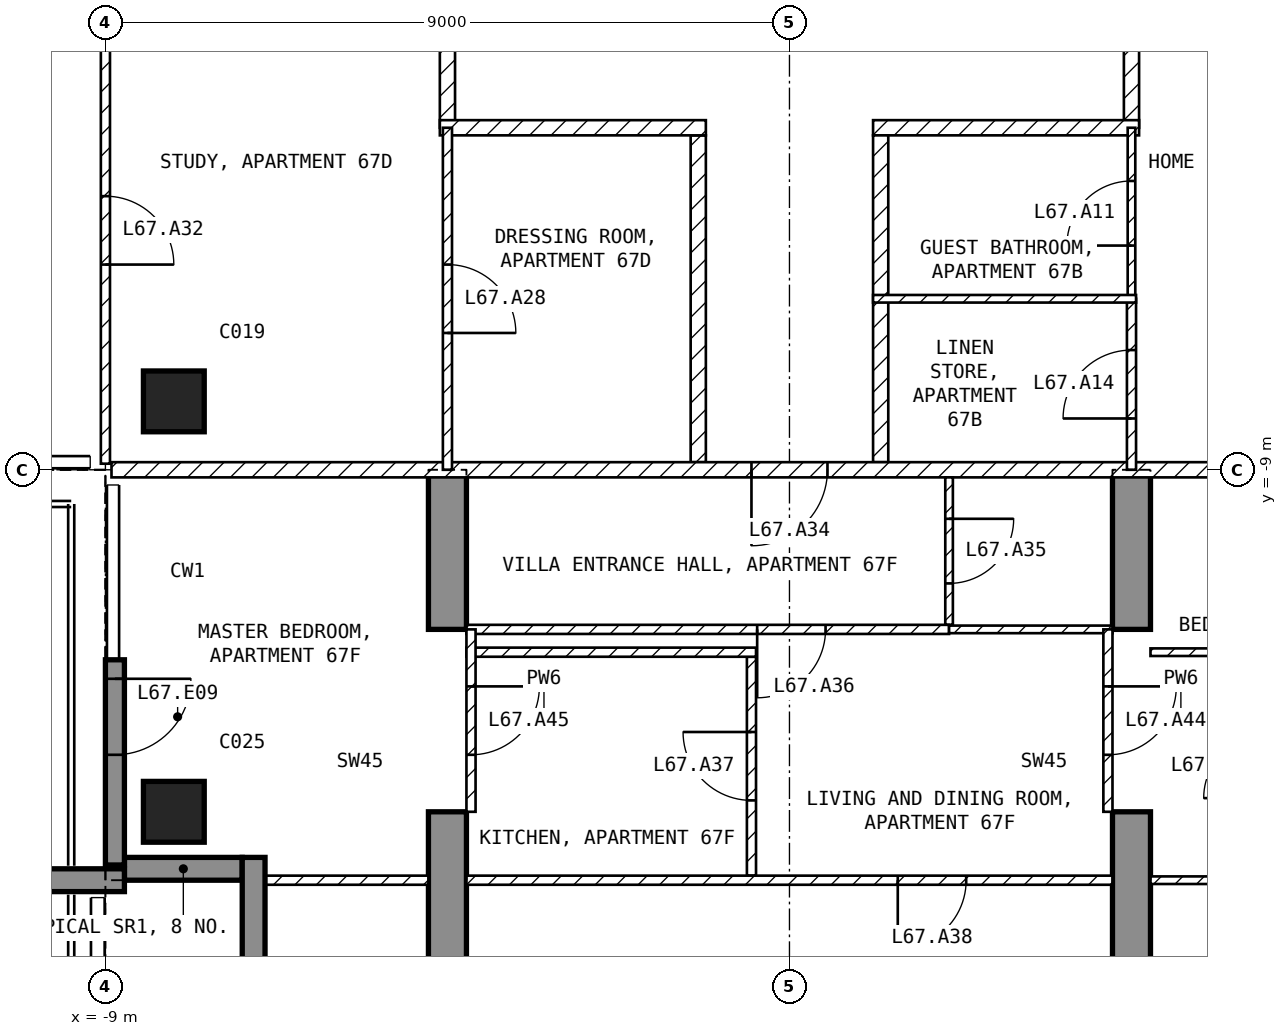
"""IFC4 building model, lengths in metres.
Left out: names, types, materials, properties, quantities, classifications, styles, units other than length and angle.
Written with IfcOpenShell. Run it as: python <this file> out.ifc"""

import sys

from ifc_helpers import new_model, si_unit, direction, frame, frame_2d, origin, origin_2d, place, context, subcontext, project, spatial, polyline, rectangle, outline, extrude, element, fill, save


model = new_model("IFC4")
c1 = context("Model", 3, precision=1e-05, world=origin(), true_north=direction((0.0, 1.0)))
c2 = subcontext(c1, "Body", "Model", "MODEL_VIEW")
j1 = project(units=[si_unit("LENGTHUNIT", "METRE"), si_unit("PLANEANGLEUNIT", "RADIAN")], contexts=[c1])
p1 = place(None, origin())
s1 = spatial("IfcSite", under=j1, at=p1, CompositionType="ELEMENT")
p2 = place(p1, origin())
s2 = spatial("IfcBuilding", under=s1, at=p2, CompositionType="ELEMENT")
p3 = place(p2, frame((0.0, 0.0, 264.0)))
s3 = spatial("IfcBuildingStorey", under=s2, at=p3, CompositionType="ELEMENT", Elevation=264.0)
for number, where, z_axis, x_axis in (
    (1, (-8.1, -13.5, -0.25), (0.0, 0.0, 1.0), (1.0, 0.0, 0.0)),
    (2, (-8.1, -8.1, -0.25), (0.0, 0.0, 1.0), (1.0, 0.0, 0.0)),
):
    element("IfcColumn", number, at=place(p3, frame(where, z_axis=z_axis, x_axis=x_axis)), inside=s3, PredefinedType="COLUMN", context=c2, shape_type="SweptSolid", body=[
        extrude(rectangle(XDim=0.8, YDim=0.8, at=origin_2d()), origin(), (0.0, 0.0, 1.0), 3.5),
    ])
for number, where, z_axis, x_axis in (
    (3, (-4.75, -16.7, -0.25), (1.0, 0.0, 0.0), (0.0, 1.0, 0.0)),
    (4, (4.25, -16.7, -0.25), (1.0, 0.0, 0.0), (0.0, 1.0, 0.0)),
):
    element("IfcWall", number, at=place(p3, frame(where, z_axis=z_axis, x_axis=x_axis)), inside=s3, PredefinedType="SHEAR", context=c2, shape_type="SweptSolid", body=[
        extrude(outline(polyline([(0.0, 0.0), (3.2, 0.0), (3.2, 2.65), (5.6, 2.65), (5.6, 0.0), (7.7, 0.0), (7.7, 3.5), (0.0, 3.5), (0.0, 0.0)])), origin(), (0.0, 0.0, 1.0), 0.5),
    ])
p4 = place(p3, frame((-8.875, -11.5, 0.0), z_axis=(0.0, 0.0, 1.0), x_axis=(0.0, -1.0, 0.0)))
e5 = element("IfcWall", 5, at=p4, inside=s3, PredefinedType="SOLIDWALL", context=c2, shape_type="SweptSolid", body=[
    extrude(rectangle(XDim=2.7, YDim=0.25, at=frame_2d((1.35, 0.0))), origin(), (0.0, 0.0, 1.0), 3.25),
])
p5 = place(p4, frame((0.25, 0.0, 0.0)))
e6 = element("IfcOpeningElement", 6, at=p5, cuts=e5, PredefinedType="OPENING", context=c2, shape_type="SweptSolid", body=[
    extrude(rectangle(XDim=1.0, YDim=2.4, at=frame_2d((0.5, 1.2))), frame((0.0, 0.135, 0.0), z_axis=(0.0, -1.0, 0.0), x_axis=(1.0, 0.0, 0.0)), (0.0, 0.0, 1.0), 0.27),
])
p6 = place(p3, frame((-8.75, -14.25, 0.0), z_axis=(0.0, 0.0, 1.0), x_axis=(1.0, 0.0, 0.0)))
e7 = element("IfcWall", 7, at=p6, inside=s3, PredefinedType="SOLIDWALL", context=c2, shape_type="SweptSolid", body=[
    extrude(rectangle(XDim=1.55, YDim=0.3, at=frame_2d((0.775, 0.0))), origin(), (0.0, 0.0, 1.0), 3.25),
])
p7 = place(p3, frame((-7.05, -14.1, 0.0), z_axis=(0.0, 0.0, 1.0), x_axis=(0.0, -1.0, 0.0)))
e8 = element("IfcWall", 8, at=p7, inside=s3, PredefinedType="SOLIDWALL", context=c2, shape_type="SweptSolid", body=[
    extrude(rectangle(XDim=1.8, YDim=0.3, at=frame_2d((0.9, 0.0))), origin(), (0.0, 0.0, 1.0), 3.25),
])
p8 = place(p3, frame((-8.75, -14.4, 0.0), z_axis=(0.0, 0.0, 1.0), x_axis=(-1.0, 0.0, 0.0)))
e9 = element("IfcWall", 9, at=p8, inside=s3, PredefinedType="SOLIDWALL", context=c2, shape_type="SweptSolid", body=[
    extrude(rectangle(XDim=2.95, YDim=0.3, at=frame_2d((1.475, 0.0))), origin(), (0.0, 0.0, 1.0), 3.25),
])
p9 = place(p3, frame((4.5, -1.3, 0.0), z_axis=(0.0, 0.0, 1.0), x_axis=(0.0, -1.0, 0.0)))
e10 = element("IfcWall", 10, at=p9, inside=s3, PredefinedType="PARTITIONING", context=c2, shape_type="SweptSolid", body=[
    extrude(rectangle(XDim=3.2, YDim=0.2, at=frame_2d((1.6, 0.0))), origin(), (0.0, 0.0, 1.0), 3.25),
])
p10 = place(p3, frame((4.6, -4.5, 0.0), z_axis=(0.0, 0.0, 1.0), x_axis=(-1.0, 0.0, 0.0)))
e11 = element("IfcWall", 11, at=p10, inside=s3, PredefinedType="PARTITIONING", context=c2, shape_type="SweptSolid", body=[
    extrude(rectangle(XDim=3.5, YDim=0.2, at=frame_2d((1.75, 0.0))), origin(), (0.0, 0.0, 1.0), 3.25),
])
p11 = place(p3, frame((1.2, -4.6, 0.0), z_axis=(0.0, 0.0, 1.0), x_axis=(0.0, -1.0, 0.0)))
e12 = element("IfcWall", 12, at=p11, inside=s3, PredefinedType="PARTITIONING", context=c2, shape_type="SweptSolid", body=[
    extrude(rectangle(XDim=4.3, YDim=0.2, at=frame_2d((2.15, 0.0))), origin(), (0.0, 0.0, 1.0), 3.25),
])
p12 = place(p3, frame((-4.5, -4.5, 0.0), z_axis=(0.0, 0.0, 1.0), x_axis=(0.0, 1.0, 0.0)))
e13 = element("IfcWall", 13, at=p12, inside=s3, PredefinedType="PARTITIONING", context=c2, shape_type="SweptSolid", body=[
    extrude(rectangle(XDim=3.2, YDim=0.2, at=frame_2d((1.6, 0.0))), origin(), (0.0, 0.0, 1.0), 3.25),
])
p13 = place(p3, frame((-1.2, -8.9, 0.0), z_axis=(0.0, 0.0, 1.0), x_axis=(0.0, 1.0, 0.0)))
e14 = element("IfcWall", 14, at=p13, inside=s3, PredefinedType="PARTITIONING", context=c2, shape_type="SweptSolid", body=[
    extrude(rectangle(XDim=4.3, YDim=0.2, at=frame_2d((2.15, 0.0))), origin(), (0.0, 0.0, 1.0), 3.25),
])
p14 = place(p3, frame((-1.1, -4.5, 0.0), z_axis=(0.0, 0.0, 1.0), x_axis=(-1.0, 0.0, 0.0)))
e15 = element("IfcWall", 15, at=p14, inside=s3, PredefinedType="PARTITIONING", context=c2, shape_type="SweptSolid", body=[
    extrude(rectangle(XDim=3.5, YDim=0.2, at=frame_2d((1.75, 0.0))), origin(), (0.0, 0.0, 1.0), 3.25),
])
p15 = place(p3, frame((8.92, -9.0, 0.0), z_axis=(0.0, 0.0, 1.0), x_axis=(-1.0, 0.0, 0.0)))
e16 = element("IfcWall", 16, at=p15, inside=s3, PredefinedType="PARTITIONING", context=c2, shape_type="SweptSolid", body=[
    extrude(rectangle(XDim=17.84, YDim=0.2, at=frame_2d((8.92, 0.0))), origin(), (0.0, 0.0, 1.0), 3.25),
])
p16 = place(p15, frame((8.42, 0.0, 0.0)))
e17 = element("IfcOpeningElement", 17, at=p16, cuts=e16, PredefinedType="OPENING", context=c2, shape_type="SweptSolid", body=[
    extrude(rectangle(XDim=1.0, YDim=2.1, at=frame_2d((0.5, 1.05))), frame((0.0, 0.11, 0.0), z_axis=(0.0, -1.0, 0.0), x_axis=(1.0, 0.0, 0.0)), (0.0, 0.0, 1.0), 0.22),
])
p17 = place(p3, frame((4.5, -6.75, 0.0), z_axis=(0.0, 0.0, 1.0), x_axis=(0.0, 1.0, 0.0)))
e18 = element("IfcWall", 18, at=p17, inside=s3, PredefinedType="PARTITIONING", context=c2, shape_type="SweptSolid", body=[
    extrude(rectangle(XDim=2.25, YDim=0.1, at=frame_2d((1.125, 0.0))), origin(), (0.0, 0.0, 1.0), 3.25),
])
p18 = place(p17, frame((0.7, 0.0, 0.0)))
e19 = element("IfcOpeningElement", 19, at=p18, cuts=e18, PredefinedType="OPENING", context=c2, shape_type="SweptSolid", body=[
    extrude(rectangle(XDim=0.85, YDim=2.1, at=frame_2d((0.425, 1.05))), frame((0.0, 0.06, 0.0), z_axis=(0.0, -1.0, 0.0), x_axis=(1.0, 0.0, 0.0)), (0.0, 0.0, 1.0), 0.12),
])
p19 = place(p3, frame((4.5, -9.0, 0.0), z_axis=(0.0, 0.0, 1.0), x_axis=(0.0, 1.0, 0.0)))
e20 = element("IfcWall", 20, at=p19, inside=s3, PredefinedType="PARTITIONING", context=c2, shape_type="SweptSolid", body=[
    extrude(rectangle(XDim=2.25, YDim=0.12, at=frame_2d((1.125, 0.0))), origin(), (0.0, 0.0, 1.0), 3.25),
])
p20 = place(p19, frame((0.675, 0.0, 0.0)))
e21 = element("IfcOpeningElement", 21, at=p20, cuts=e20, PredefinedType="OPENING", context=c2, shape_type="SweptSolid", body=[
    extrude(rectangle(XDim=0.9, YDim=2.1, at=frame_2d((0.45, 1.05))), frame((0.0, 0.07, 0.0), z_axis=(0.0, -1.0, 0.0), x_axis=(1.0, 0.0, 0.0)), (0.0, 0.0, 1.0), 0.14),
])
p21 = place(p3, frame((4.56, -6.75, 0.0), z_axis=(0.0, 0.0, 1.0), x_axis=(-1.0, 0.0, 0.0)))
e22 = element("IfcWall", 22, at=p21, inside=s3, PredefinedType="PARTITIONING", context=c2, shape_type="SweptSolid", body=[
    extrude(rectangle(XDim=3.46, YDim=0.1, at=frame_2d((1.73, 0.0))), origin(), (0.0, 0.0, 1.0), 3.25),
])
p22 = place(p3, frame((-9.0, -3.0, 0.0), z_axis=(0.0, 0.0, 1.0), x_axis=(0.0, -1.0, 0.0)))
e23 = element("IfcWall", 23, at=p22, inside=s3, PredefinedType="PARTITIONING", context=c2, shape_type="SweptSolid", body=[
    extrude(rectangle(XDim=5.92, YDim=0.12, at=frame_2d((2.96, 0.0))), origin(), (0.0, 0.0, 1.0), 3.25),
])
p23 = place(p22, frame((2.4, 0.0, 0.0)))
e24 = element("IfcOpeningElement", 24, at=p23, cuts=e23, PredefinedType="OPENING", context=c2, shape_type="SweptSolid", body=[
    extrude(rectangle(XDim=0.9, YDim=2.1, at=frame_2d((0.45, 1.05))), frame((0.0, 0.07, 0.0), z_axis=(0.0, -1.0, 0.0), x_axis=(1.0, 0.0, 0.0)), (0.0, 0.0, 1.0), 0.14),
])
p24 = place(p3, frame((-4.5, -4.5, 0.0), z_axis=(0.0, 0.0, 1.0), x_axis=(0.0, -1.0, 0.0)))
e25 = element("IfcWall", 25, at=p24, inside=s3, PredefinedType="PARTITIONING", context=c2, shape_type="SweptSolid", body=[
    extrude(rectangle(XDim=4.5, YDim=0.12, at=frame_2d((2.25, 0.0))), origin(), (0.0, 0.0, 1.0), 3.25),
])
p25 = place(p24, frame((1.8, 0.0, 0.0)))
e26 = element("IfcOpeningElement", 26, at=p25, cuts=e25, PredefinedType="OPENING", context=c2, shape_type="SweptSolid", body=[
    extrude(rectangle(XDim=0.9, YDim=2.1, at=frame_2d((0.45, 1.05))), frame((0.0, 0.07, 0.0), z_axis=(0.0, -1.0, 0.0), x_axis=(1.0, 0.0, 0.0)), (0.0, 0.0, 1.0), 0.14),
])
p26 = place(p3, frame((2.1, -9.1, 0.0), z_axis=(0.0, 0.0, 1.0), x_axis=(0.0, -1.0, 0.0)))
e27 = element("IfcWall", 27, at=p26, inside=s3, PredefinedType="PARTITIONING", context=c2, shape_type="SweptSolid", body=[
    extrude(rectangle(XDim=1.94, YDim=0.1, at=frame_2d((0.97, 0.0))), origin(), (0.0, 0.0, 1.0), 3.25),
])
p27 = place(p26, frame((0.545, 0.0, 0.0)))
e28 = element("IfcOpeningElement", 28, at=p27, cuts=e27, PredefinedType="OPENING", context=c2, shape_type="SweptSolid", body=[
    extrude(rectangle(XDim=0.85, YDim=2.1, at=frame_2d((0.425, 1.05))), frame((0.0, 0.06, 0.0), z_axis=(0.0, -1.0, 0.0), x_axis=(1.0, 0.0, 0.0)), (0.0, 0.0, 1.0), 0.12),
])
p28 = place(p3, frame((2.1, -11.1, 0.0), z_axis=(0.0, 0.0, 1.0), x_axis=(-1.0, 0.0, 0.0)))
e29 = element("IfcWall", 29, at=p28, inside=s3, PredefinedType="PARTITIONING", context=c2, shape_type="SweptSolid", body=[
    extrude(rectangle(XDim=6.35, YDim=0.12, at=frame_2d((3.175, 0.0))), origin(), (0.0, 0.0, 1.0), 3.25),
])
p29 = place(p28, frame((1.625, 0.0, 0.0)))
e30 = element("IfcOpeningElement", 30, at=p29, cuts=e29, PredefinedType="OPENING", context=c2, shape_type="SweptSolid", body=[
    extrude(rectangle(XDim=0.9, YDim=2.1, at=frame_2d((0.45, 1.05))), frame((0.0, 0.07, 0.0), z_axis=(0.0, -1.0, 0.0), x_axis=(1.0, 0.0, 0.0)), (0.0, 0.0, 1.0), 0.14),
])
p30 = place(p3, frame((4.25, -11.1, 0.0), z_axis=(0.0, 0.0, 1.0), x_axis=(-1.0, 0.0, 0.0)))
e31 = element("IfcWall", 31, at=p30, inside=s3, PredefinedType="PARTITIONING", context=c2, shape_type="SweptSolid", body=[
    extrude(rectangle(XDim=2.15, YDim=0.1, at=frame_2d((1.075, 0.0))), origin(), (0.0, 0.0, 1.0), 3.25),
])
p31 = place(p3, frame((-0.5, -14.34, 0.0), z_axis=(0.0, 0.0, 1.0), x_axis=(0.0, 1.0, 0.0)))
e32 = element("IfcWall", 32, at=p31, inside=s3, PredefinedType="PARTITIONING", context=c2, shape_type="SweptSolid", body=[
    extrude(rectangle(XDim=2.88, YDim=0.12, at=frame_2d((1.44, 0.0))), origin(), (0.0, 0.0, 1.0), 3.25),
])
p32 = place(p31, frame((0.99, 0.0, 0.0)))
e33 = element("IfcOpeningElement", 33, at=p32, cuts=e32, PredefinedType="OPENING", context=c2, shape_type="SweptSolid", body=[
    extrude(rectangle(XDim=0.9, YDim=2.1, at=frame_2d((0.45, 1.05))), frame((0.0, 0.07, 0.0), z_axis=(0.0, -1.0, 0.0), x_axis=(1.0, 0.0, 0.0)), (0.0, 0.0, 1.0), 0.14),
])
p33 = place(p3, frame((-0.44, -11.4, 0.0), z_axis=(0.0, 0.0, 1.0), x_axis=(-1.0, 0.0, 0.0)))
e34 = element("IfcWall", 34, at=p33, inside=s3, PredefinedType="PARTITIONING", context=c2, shape_type="SweptSolid", body=[
    extrude(rectangle(XDim=3.81, YDim=0.12, at=frame_2d((1.905, 0.0))), origin(), (0.0, 0.0, 1.0), 3.25),
])
p34 = place(p3, frame((4.25, -14.4, 0.0), z_axis=(0.0, 0.0, 1.0), x_axis=(-1.0, 0.0, 0.0)))
e35 = element("IfcWall", 35, at=p34, inside=s3, PredefinedType="PARTITIONING", context=c2, shape_type="SweptSolid", body=[
    extrude(rectangle(XDim=8.5, YDim=0.12, at=frame_2d((4.25, 0.0))), origin(), (0.0, 0.0, 1.0), 3.25),
])
p35 = place(p34, frame((1.925, 0.0, 0.0)))
e36 = element("IfcOpeningElement", 36, at=p35, cuts=e35, PredefinedType="OPENING", context=c2, shape_type="SweptSolid", body=[
    extrude(rectangle(XDim=0.9, YDim=2.1, at=frame_2d((0.45, 1.05))), frame((0.0, 0.07, 0.0), z_axis=(0.0, -1.0, 0.0), x_axis=(1.0, 0.0, 0.0)), (0.0, 0.0, 1.0), 0.14),
])
p36 = place(p3, frame((6.35, -11.4, 0.0), z_axis=(0.0, 0.0, 1.0), x_axis=(-1.0, 0.0, 0.0)))
e37 = element("IfcWall", 37, at=p36, inside=s3, PredefinedType="PARTITIONING", context=c2, shape_type="SweptSolid", body=[
    extrude(rectangle(XDim=1.6, YDim=0.1, at=frame_2d((0.8, 0.0))), origin(), (0.0, 0.0, 1.0), 3.25),
])
p37 = place(p3, frame((6.3, -14.4, 0.0), z_axis=(0.0, 0.0, 1.0), x_axis=(-1.0, 0.0, 0.0)))
e38 = element("IfcWall", 38, at=p37, inside=s3, PredefinedType="PARTITIONING", context=c2, shape_type="SweptSolid", body=[
    extrude(rectangle(XDim=1.55, YDim=0.1, at=frame_2d((0.775, 0.0))), origin(), (0.0, 0.0, 1.0), 3.25),
])
p38 = place(p3, frame((-4.75, -14.4, 0.0), z_axis=(0.0, 0.0, 1.0), x_axis=(-1.0, 0.0, 0.0)))
e39 = element("IfcWall", 39, at=p38, inside=s3, PredefinedType="PARTITIONING", context=c2, shape_type="SweptSolid", body=[
    extrude(rectangle(XDim=2.37, YDim=0.12, at=frame_2d((1.185, 0.0))), origin(), (0.0, 0.0, 1.0), 3.25),
])
p39 = place(p3, frame((4.19, -11.1, 0.0), z_axis=(0.0, 0.0, 1.0), x_axis=(0.0, -1.0, 0.0)))
e40 = element("IfcWall", 40, at=p39, inside=s3, PredefinedType="PARTITIONING", context=c2, shape_type="SweptSolid", body=[
    extrude(rectangle(XDim=2.4, YDim=0.12, at=frame_2d((1.2, 0.0))), origin(), (0.0, 0.0, 1.0), 2.4),
])
p40 = place(p39, frame((0.75, 0.0, 0.0)))
e41 = element("IfcOpeningElement", 41, at=p40, cuts=e40, PredefinedType="OPENING", context=c2, shape_type="SweptSolid", body=[
    extrude(rectangle(XDim=0.9, YDim=2.1, at=frame_2d((0.45, 1.05))), frame((0.0, 0.07, 0.0), z_axis=(0.0, -1.0, 0.0), x_axis=(1.0, 0.0, 0.0)), (0.0, 0.0, 1.0), 0.14),
])
p41 = place(p3, frame((-4.19, -11.1, 0.0), z_axis=(0.0, 0.0, 1.0), x_axis=(0.0, -1.0, 0.0)))
e42 = element("IfcWall", 42, at=p41, inside=s3, PredefinedType="PARTITIONING", context=c2, shape_type="SweptSolid", body=[
    extrude(rectangle(XDim=2.4, YDim=0.12, at=frame_2d((1.2, 0.0))), origin(), (0.0, 0.0, 1.0), 2.4),
])
p42 = place(p41, frame((0.75, 0.0, 0.0)))
e43 = element("IfcOpeningElement", 43, at=p42, cuts=e42, PredefinedType="OPENING", context=c2, shape_type="SweptSolid", body=[
    extrude(rectangle(XDim=0.9, YDim=2.1, at=frame_2d((0.45, 1.05))), frame((0.0, 0.07, 0.0), z_axis=(0.0, -1.0, 0.0), x_axis=(1.0, 0.0, 0.0)), (0.0, 0.0, 1.0), 0.14),
])
p43 = place(p5, origin())
e44 = element("IfcDoor", 44, at=p43, inside=s3, OperationType="SINGLE_SWING_LEFT", PredefinedType="DOOR", context=c2, shape_type="SweptSolid", body=[
    extrude(rectangle(XDim=1.0, YDim=2.4, at=frame_2d((0.5, 1.2))), frame((0.0, 0.025, 0.0), z_axis=(0.0, -1.0, 0.0), x_axis=(1.0, 0.0, 0.0)), (0.0, 0.0, 1.0), 0.05),
])
fill(e6, e44)
p44 = place(p18, origin())
e45 = element("IfcDoor", 45, at=p44, inside=s3, OperationType="SINGLE_SWING_LEFT", PredefinedType="DOOR", context=c2, shape_type="SweptSolid", body=[
    extrude(rectangle(XDim=0.85, YDim=2.1, at=frame_2d((0.425, 1.05))), frame((0.0, 0.025, 0.0), z_axis=(0.0, -1.0, 0.0), x_axis=(1.0, 0.0, 0.0)), (0.0, 0.0, 1.0), 0.05),
])
fill(e19, e45)
p45 = place(p20, origin())
e46 = element("IfcDoor", 46, at=p45, inside=s3, OperationType="SINGLE_SWING_LEFT", PredefinedType="DOOR", context=c2, shape_type="SweptSolid", body=[
    extrude(rectangle(XDim=0.9, YDim=2.1, at=frame_2d((0.45, 1.05))), frame((0.0, 0.025, 0.0), z_axis=(0.0, -1.0, 0.0), x_axis=(1.0, 0.0, 0.0)), (0.0, 0.0, 1.0), 0.05),
])
fill(e21, e46)
p46 = place(p25, origin())
e47 = element("IfcDoor", 47, at=p46, inside=s3, OperationType="SINGLE_SWING_RIGHT", PredefinedType="DOOR", context=c2, shape_type="SweptSolid", body=[
    extrude(rectangle(XDim=0.9, YDim=2.1, at=frame_2d((0.45, 1.05))), frame((0.0, 0.025, 0.0), z_axis=(0.0, -1.0, 0.0), x_axis=(1.0, 0.0, 0.0)), (0.0, 0.0, 1.0), 0.05),
])
fill(e26, e47)
p47 = place(p23, origin())
e48 = element("IfcDoor", 48, at=p47, inside=s3, OperationType="SINGLE_SWING_RIGHT", PredefinedType="DOOR", context=c2, shape_type="SweptSolid", body=[
    extrude(rectangle(XDim=0.9, YDim=2.1, at=frame_2d((0.45, 1.05))), frame((0.0, 0.025, 0.0), z_axis=(0.0, -1.0, 0.0), x_axis=(1.0, 0.0, 0.0)), (0.0, 0.0, 1.0), 0.05),
])
fill(e24, e48)
p48 = place(p16, origin())
e49 = element("IfcDoor", 49, at=p48, inside=s3, OperationType="SINGLE_SWING_RIGHT", PredefinedType="DOOR", context=c2, shape_type="SweptSolid", body=[
    extrude(rectangle(XDim=1.0, YDim=2.1, at=frame_2d((0.5, 1.05))), frame((0.0, 0.025, 0.0), z_axis=(0.0, -1.0, 0.0), x_axis=(1.0, 0.0, 0.0)), (0.0, 0.0, 1.0), 0.05),
])
fill(e17, e49)
p49 = place(p27, origin())
e50 = element("IfcDoor", 50, at=p49, inside=s3, OperationType="SINGLE_SWING_LEFT", PredefinedType="DOOR", context=c2, shape_type="SweptSolid", body=[
    extrude(rectangle(XDim=0.85, YDim=2.1, at=frame_2d((0.425, 1.05))), frame((0.0, 0.025, 0.0), z_axis=(0.0, -1.0, 0.0), x_axis=(1.0, 0.0, 0.0)), (0.0, 0.0, 1.0), 0.05),
])
fill(e28, e50)
p50 = place(p29, origin())
e51 = element("IfcDoor", 51, at=p50, inside=s3, OperationType="SINGLE_SWING_RIGHT", PredefinedType="DOOR", context=c2, shape_type="SweptSolid", body=[
    extrude(rectangle(XDim=0.9, YDim=2.1, at=frame_2d((0.45, 1.05))), frame((0.0, 0.025, 0.0), z_axis=(0.0, -1.0, 0.0), x_axis=(1.0, 0.0, 0.0)), (0.0, 0.0, 1.0), 0.05),
])
fill(e30, e51)
p51 = place(p32, origin())
e52 = element("IfcDoor", 52, at=p51, inside=s3, OperationType="SINGLE_SWING_RIGHT", PredefinedType="DOOR", context=c2, shape_type="SweptSolid", body=[
    extrude(rectangle(XDim=0.9, YDim=2.1, at=frame_2d((0.45, 1.05))), frame((0.0, 0.025, 0.0), z_axis=(0.0, -1.0, 0.0), x_axis=(1.0, 0.0, 0.0)), (0.0, 0.0, 1.0), 0.05),
])
fill(e33, e52)
p52 = place(p35, origin())
e53 = element("IfcDoor", 53, at=p52, inside=s3, OperationType="SINGLE_SWING_RIGHT", PredefinedType="DOOR", context=c2, shape_type="SweptSolid", body=[
    extrude(rectangle(XDim=0.9, YDim=2.1, at=frame_2d((0.45, 1.05))), frame((0.0, 0.025, 0.0), z_axis=(0.0, -1.0, 0.0), x_axis=(1.0, 0.0, 0.0)), (0.0, 0.0, 1.0), 0.05),
])
fill(e36, e53)
p53 = place(p40, origin())
e54 = element("IfcDoor", 54, at=p53, inside=s3, OperationType="SINGLE_SWING_LEFT", PredefinedType="DOOR", context=c2, shape_type="SweptSolid", body=[
    extrude(rectangle(XDim=0.9, YDim=2.1, at=frame_2d((0.45, 1.05))), frame((0.0, 0.025, 0.0), z_axis=(0.0, -1.0, 0.0), x_axis=(1.0, 0.0, 0.0)), (0.0, 0.0, 1.0), 0.05),
])
fill(e41, e54)
p54 = place(p42, origin())
e55 = element("IfcDoor", 55, at=p54, inside=s3, OperationType="SINGLE_SWING_LEFT", PredefinedType="DOOR", context=c2, shape_type="SweptSolid", body=[
    extrude(rectangle(XDim=0.9, YDim=2.1, at=frame_2d((0.45, 1.05))), frame((0.0, 0.025, 0.0), z_axis=(0.0, -1.0, 0.0), x_axis=(1.0, 0.0, 0.0)), (0.0, 0.0, 1.0), 0.05),
])
fill(e43, e55)
save(model, sys.argv[1])
